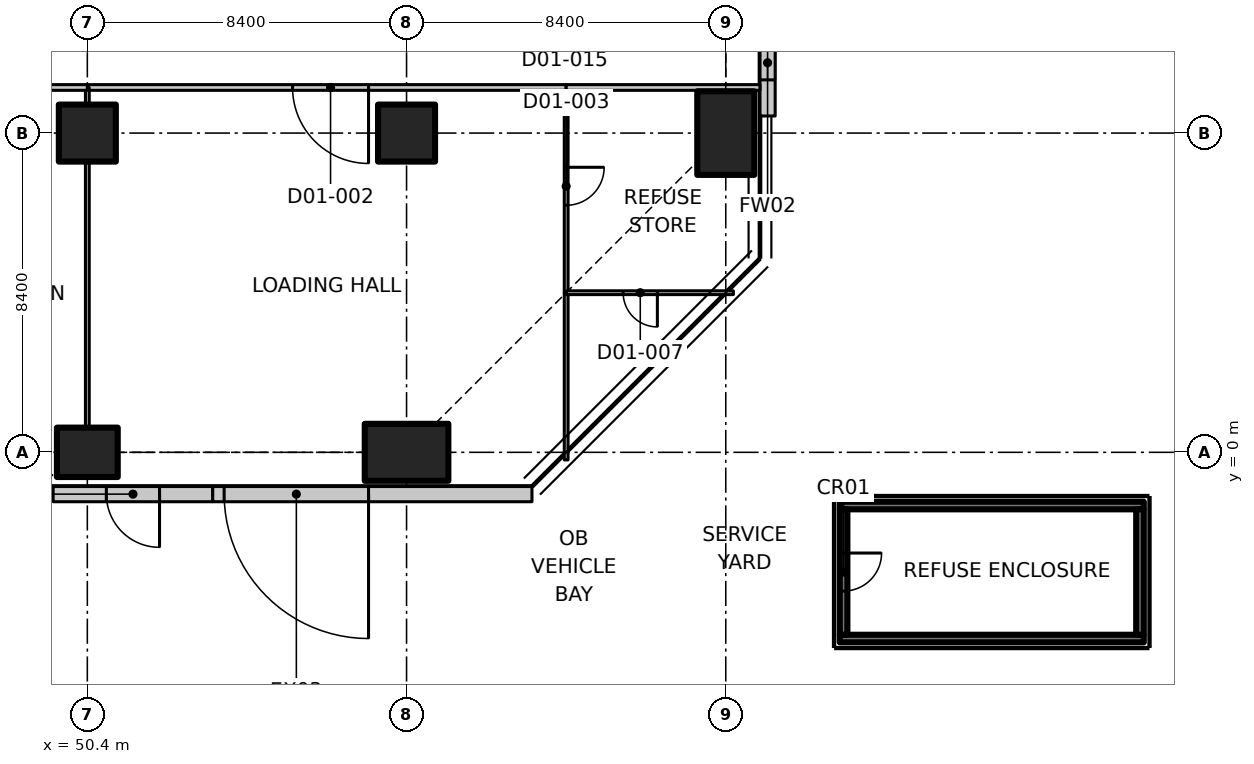
"""IFC4 building model, lengths in metres.
Left out: names, types, materials, properties, quantities, classifications, styles, units other than length and angle.
Written with IfcOpenShell. Run it as: python <this file> out.ifc"""

import sys

from ifc_helpers import new_model, si_unit, direction, frame, frame_2d, origin, origin_2d, place, context, subcontext, project, spatial, polyline, rectangle, outline, extrude, element, fill, save


model = new_model("IFC4")
c1 = context("Model", 3, precision=1e-05, world=origin(), true_north=direction((0.0, 1.0)))
c2 = subcontext(c1, "Body", "Model", "MODEL_VIEW")
j1 = project(units=[si_unit("LENGTHUNIT", "METRE"), si_unit("PLANEANGLEUNIT", "RADIAN")], contexts=[c1])
p1 = place(None, origin())
s1 = spatial("IfcSite", under=j1, at=p1, CompositionType="ELEMENT")
p2 = place(p1, origin())
s2 = spatial("IfcBuilding", under=s1, at=p2, CompositionType="ELEMENT")
p3 = place(p2, origin())
s3 = spatial("IfcBuildingStorey", under=s2, at=p3, CompositionType="ELEMENT", Elevation=0.0)
p4 = place(p3, frame((50.4, 0.0, 0.0), z_axis=(0.0, 0.0, 1.0), x_axis=(0.0, 1.0, 0.0)))
e1 = element("IfcColumn", 1, at=p4, inside=s3, PredefinedType="COLUMN", context=c2, shape_type="SweptSolid", body=[
    extrude(rectangle(XDim=1.3, YDim=1.6, at=origin_2d()), origin(), (0.0, 0.0, 1.0), 6.75),
])
p5 = place(p3, frame((50.4, 8.4, 0.0), z_axis=(0.0, 0.0, 1.0), x_axis=(1.0, 0.0, 0.0)))
e2 = element("IfcColumn", 2, at=p5, inside=s3, PredefinedType="COLUMN", context=c2, shape_type="SweptSolid", body=[
    extrude(rectangle(XDim=1.5, YDim=1.5, at=origin_2d()), origin(), (0.0, 0.0, 1.0), 6.75),
])
p6 = place(p3, frame((58.8, 0.0, 0.0), z_axis=(0.0, 0.0, 1.0), x_axis=(0.0, 1.0, 0.0)))
e3 = element("IfcColumn", 3, at=p6, inside=s3, PredefinedType="COLUMN", context=c2, shape_type="SweptSolid", body=[
    extrude(rectangle(XDim=1.5, YDim=2.2, at=origin_2d()), origin(), (0.0, 0.0, 1.0), 6.75),
])
p7 = place(p3, frame((58.8, 8.4, 0.0), z_axis=(0.0, 0.0, 1.0), x_axis=(1.0, 0.0, 0.0)))
e4 = element("IfcColumn", 4, at=p7, inside=s3, PredefinedType="COLUMN", context=c2, shape_type="SweptSolid", body=[
    extrude(rectangle(XDim=1.5, YDim=1.5, at=origin_2d()), origin(), (0.0, 0.0, 1.0), 6.75),
])
p8 = place(p3, frame((67.2, 8.4, 0.0), z_axis=(0.0, 0.0, 1.0), x_axis=(1.0, 0.0, 0.0)))
e5 = element("IfcColumn", 5, at=p8, inside=s3, PredefinedType="COLUMN", context=c2, shape_type="SweptSolid", body=[
    extrude(rectangle(XDim=1.5, YDim=2.2, at=origin_2d()), origin(), (0.0, 0.0, 1.0), 6.75),
])
p9 = place(p3, frame((53.7, -1.1, 0.0), z_axis=(0.0, 0.0, 1.0), x_axis=(-1.0, 0.0, 0.0)))
e6 = element("IfcWall", 6, at=p9, inside=s3, PredefinedType="SOLIDWALL", context=c2, shape_type="SweptSolid", body=[
    extrude(rectangle(XDim=4.2, YDim=0.4, at=frame_2d((2.1, 0.0))), origin(), (0.0, 0.0, 1.0), 6.75),
])
p10 = place(p9, frame((1.4, 0.0, 0.0)))
e7 = element("IfcOpeningElement", 7, at=p10, cuts=e6, PredefinedType="OPENING", context=c2, shape_type="SweptSolid", body=[
    extrude(rectangle(XDim=1.4, YDim=2.4, at=frame_2d((0.7, 1.2))), frame((0.0, 0.21, 0.0), z_axis=(0.0, -1.0, 0.0), x_axis=(1.0, 0.0, 0.0)), (0.0, 0.0, 1.0), 0.42),
])
p11 = place(p3, frame((62.1, -1.1, 0.0), z_axis=(0.0, 0.0, 1.0), x_axis=(-1.0, 0.0, 0.0)))
e8 = element("IfcWall", 8, at=p11, inside=s3, PredefinedType="SOLIDWALL", context=c2, shape_type="SweptSolid", body=[
    extrude(rectangle(XDim=8.4, YDim=0.4, at=frame_2d((4.2, 0.0))), origin(), (0.0, 0.0, 1.0), 6.75),
])
p12 = place(p11, frame((4.3, 0.0, 0.0)))
e9 = element("IfcOpeningElement", 9, at=p12, cuts=e8, PredefinedType="OPENING", context=c2, shape_type="SweptSolid", body=[
    extrude(rectangle(XDim=3.8, YDim=4.5, at=frame_2d((1.9, 2.25))), frame((0.0, 0.21, 0.0), z_axis=(0.0, -1.0, 0.0), x_axis=(1.0, 0.0, 0.0)), (0.0, 0.0, 1.0), 0.42),
])
p13 = place(p3, frame((68.3, 16.35, 0.0), z_axis=(0.0, 0.0, 1.0), x_axis=(0.0, -1.0, 0.0)))
e10 = element("IfcWall", 10, at=p13, inside=s3, PredefinedType="SOLIDWALL", context=c2, shape_type="SweptSolid", body=[
    extrude(rectangle(XDim=7.5, YDim=0.4, at=frame_2d((3.75, 0.0))), origin(), (0.0, 0.0, 1.0), 6.75),
])
p14 = place(p13, frame((1.95, 0.0, 0.0)))
e11 = element("IfcOpeningElement", 11, at=p14, cuts=e10, PredefinedType="OPENING", context=c2, shape_type="SweptSolid", body=[
    extrude(rectangle(XDim=3.6, YDim=2.8, at=frame_2d((1.8, 1.4))), frame((0.0, 0.21, 0.0), z_axis=(0.0, -1.0, 0.0), x_axis=(1.0, 0.0, 0.0)), (0.0, 0.0, 1.0), 0.42),
])
p15 = place(p13, frame((0.95, 0.0, 0.0)))
e12 = element("IfcOpeningElement", 12, at=p15, cuts=e10, PredefinedType="OPENING", context=c2, shape_type="SweptSolid", body=[
    extrude(rectangle(XDim=0.9, YDim=2.8, at=frame_2d((0.45, 1.4))), frame((0.0, 0.21, 0.0), z_axis=(0.0, -1.0, 0.0), x_axis=(1.0, 0.0, 0.0)), (0.0, 0.0, 1.0), 0.42),
])
p16 = place(p13, frame((5.65, 0.0, 0.0)))
e13 = element("IfcOpeningElement", 13, at=p16, cuts=e10, PredefinedType="OPENING", context=c2, shape_type="SweptSolid", body=[
    extrude(rectangle(XDim=0.9, YDim=2.8, at=frame_2d((0.45, 1.4))), frame((0.0, 0.21, 0.0), z_axis=(0.0, -1.0, 0.0), x_axis=(1.0, 0.0, 0.0)), (0.0, 0.0, 1.0), 0.42),
])
for number, where, z_axis, x_axis in (
    (14, (70.2, -1.4, 0.0), (0.0, 0.0, 1.0), (1.0, 0.0, 0.0)),
    (15, (70.2, -4.9, 0.0), (0.0, 0.0, 1.0), (1.0, 0.0, 0.0)),
):
    element("IfcWall", number, at=place(p3, frame(where, z_axis=z_axis, x_axis=x_axis)), inside=s3, PredefinedType="SOLIDWALL", context=c2, shape_type="SweptSolid", body=[
        extrude(rectangle(XDim=8.0, YDim=0.2, at=frame_2d((4.0, 0.0))), origin(), (0.0, 0.0, 1.0), 3.0),
    ])
p17 = place(p3, frame((78.1, -4.8, 0.0), z_axis=(0.0, 0.0, 1.0), x_axis=(0.0, 1.0, 0.0)))
e16 = element("IfcWall", 16, at=p17, inside=s3, PredefinedType="SOLIDWALL", context=c2, shape_type="SweptSolid", body=[
    extrude(rectangle(XDim=3.3, YDim=0.2, at=frame_2d((1.65, 0.0))), origin(), (0.0, 0.0, 1.0), 3.0),
])
p18 = place(p3, frame((70.3, -1.5, 0.0), z_axis=(0.0, 0.0, 1.0), x_axis=(0.0, -1.0, 0.0)))
e17 = element("IfcWall", 17, at=p18, inside=s3, PredefinedType="SOLIDWALL", context=c2, shape_type="SweptSolid", body=[
    extrude(rectangle(XDim=3.3, YDim=0.2, at=frame_2d((1.65, 0.0))), origin(), (0.0, 0.0, 1.0), 3.0),
])
p19 = place(p18, frame((1.15, 0.0, 0.0)))
e18 = element("IfcOpeningElement", 18, at=p19, cuts=e17, PredefinedType="OPENING", context=c2, shape_type="SweptSolid", body=[
    extrude(rectangle(XDim=1.0, YDim=2.1, at=frame_2d((0.5, 1.05))), frame((0.0, 0.11, 0.0), z_axis=(0.0, -1.0, 0.0), x_axis=(1.0, 0.0, 0.0)), (0.0, 0.0, 1.0), 0.22),
])
p20 = place(p3, frame((63.0, 9.6, 0.0), z_axis=(0.0, 0.0, 1.0), x_axis=(0.0, -1.0, 0.0)))
e19 = element("IfcWall", 19, at=p20, inside=s3, PredefinedType="PARTITIONING", context=c2, shape_type="SweptSolid", body=[
    extrude(outline(polyline([(0.0, 0.0), (5.4, 0.0), (5.4, 6.38), (4.736, 6.38), (4.734, 6.73), (0.0, 6.73), (0.0, 0.0)])), frame((0.0, 0.05, 0.0), z_axis=(0.0, -1.0, 0.0), x_axis=(1.0, 0.0, 0.0)), (0.0, 0.0, 1.0), 0.1),
])
p21 = place(p20, frame((2.1, 0.0, 0.0)))
e20 = element("IfcOpeningElement", 20, at=p21, cuts=e19, PredefinedType="OPENING", context=c2, shape_type="SweptSolid", body=[
    extrude(rectangle(XDim=1.0, YDim=2.1, at=frame_2d((0.5, 1.05))), frame((0.0, 0.06, 0.0), z_axis=(0.0, -1.0, 0.0), x_axis=(1.0, 0.0, 0.0)), (0.0, 0.0, 1.0), 0.12),
])
p22 = place(p3, frame((63.0, 9.6, 0.0), z_axis=(0.0, 0.0, 1.0), x_axis=(-1.0, 0.0, 0.0)))
e21 = element("IfcWall", 21, at=p22, inside=s3, PredefinedType="PARTITIONING", context=c2, shape_type="SweptSolid", body=[
    extrude(rectangle(XDim=12.6, YDim=0.15, at=frame_2d((6.3, 0.0))), origin(), (0.0, 0.0, 1.0), 6.73),
])
p23 = place(p22, frame((5.2, 0.0, 0.0)))
e22 = element("IfcOpeningElement", 22, at=p23, cuts=e21, PredefinedType="OPENING", context=c2, shape_type="SweptSolid", body=[
    extrude(rectangle(XDim=2.0, YDim=2.4, at=frame_2d((1.0, 1.2))), frame((0.0, 0.085, 0.0), z_axis=(0.0, -1.0, 0.0), x_axis=(1.0, 0.0, 0.0)), (0.0, 0.0, 1.0), 0.17),
])
p24 = place(p3, frame((50.4, 0.67, 0.0), z_axis=(0.0, 0.0, 1.0), x_axis=(0.0, 1.0, 0.0)))
e23 = element("IfcWall", 23, at=p24, inside=s3, PredefinedType="PARTITIONING", context=c2, shape_type="SweptSolid", body=[
    extrude(rectangle(XDim=6.96, YDim=0.1, at=frame_2d((3.48, 0.0))), origin(), (0.0, 0.0, 1.0), 6.73),
])
p25 = place(p3, frame((50.4, 9.17, 0.0), z_axis=(0.0, 0.0, 1.0), x_axis=(0.0, 1.0, 0.0)))
e24 = element("IfcWall", 24, at=p25, inside=s3, PredefinedType="PARTITIONING", context=c2, shape_type="SweptSolid", body=[
    extrude(rectangle(XDim=0.43, YDim=0.1, at=frame_2d((0.215, 0.0))), origin(), (0.0, 0.0, 1.0), 6.73),
])
p26 = place(p3, frame((63.0, 4.2, 0.0), z_axis=(0.0, 0.0, 1.0), x_axis=(0.0, -1.0, 0.0)))
e25 = element("IfcWall", 25, at=p26, inside=s3, PredefinedType="PARTITIONING", context=c2, shape_type="SweptSolid", body=[
    extrude(rectangle(XDim=4.4, YDim=0.1, at=frame_2d((2.2, 0.0))), origin(), (0.0, 0.0, 1.0), 6.38),
])
p27 = place(p3, frame((63.0, 9.6, 0.0), z_axis=(0.0, 0.0, 1.0), x_axis=(1.0, 0.0, 0.0)))
e26 = element("IfcWall", 26, at=p27, inside=s3, PredefinedType="PARTITIONING", context=c2, shape_type="SweptSolid", body=[
    extrude(outline(polyline([(0.0, 0.0), (5.1, 0.0), (5.1, 6.73), (4.65, 6.73), (4.648, 6.38), (3.752, 6.38), (3.75, 6.73), (0.0, 6.73), (0.0, 0.0)])), frame((0.0, 0.075, 0.0), z_axis=(0.0, -1.0, 0.0), x_axis=(1.0, 0.0, 0.0)), (0.0, 0.0, 1.0), 0.15),
])
p28 = place(p3, frame((67.4, 4.2, 0.0), z_axis=(0.0, 0.0, 1.0), x_axis=(-1.0, 0.0, 0.0)))
e27 = element("IfcWall", 27, at=p28, inside=s3, PredefinedType="PARTITIONING", context=c2, shape_type="SweptSolid", body=[
    extrude(rectangle(XDim=4.4, YDim=0.1, at=frame_2d((2.2, 0.0))), origin(), (0.0, 0.0, 1.0), 6.38),
])
p29 = place(p28, frame((2.0, 0.0, 0.0)))
e28 = element("IfcOpeningElement", 28, at=p29, cuts=e27, PredefinedType="OPENING", context=c2, shape_type="SweptSolid", body=[
    extrude(rectangle(XDim=0.9, YDim=2.1, at=frame_2d((0.45, 1.05))), frame((0.0, 0.06, 0.0), z_axis=(0.0, -1.0, 0.0), x_axis=(1.0, 0.0, 0.0)), (0.0, 0.0, 1.0), 0.12),
])
p30 = place(p3, frame((50.4, 9.6, 0.0), z_axis=(0.0, 0.0, 1.0), x_axis=(-1.0, 0.0, 0.0)))
e29 = element("IfcWall", 29, at=p30, inside=s3, PredefinedType="PARTITIONING", context=c2, shape_type="SweptSolid", body=[
    extrude(rectangle(XDim=4.2, YDim=0.15, at=frame_2d((2.1, 0.0))), origin(), (0.0, 0.0, 1.0), 6.73),
])
p31 = place(p30, frame((1.2, 0.0, 0.0)))
e30 = element("IfcOpeningElement", 30, at=p31, cuts=e29, PredefinedType="OPENING", context=c2, shape_type="SweptSolid", body=[
    extrude(rectangle(XDim=2.0, YDim=2.4, at=frame_2d((1.0, 1.2))), frame((0.0, 0.085, 0.0), z_axis=(0.0, -1.0, 0.0), x_axis=(1.0, 0.0, 0.0)), (0.0, 0.0, 1.0), 0.17),
])
p32 = place(p10, origin())
e31 = element("IfcDoor", 31, at=p32, inside=s3, OperationType="DOUBLE_DOOR_SINGLE_SWING", PredefinedType="DOOR", context=c2, shape_type="SweptSolid", body=[
    extrude(rectangle(XDim=1.4, YDim=2.4, at=frame_2d((0.7, 1.2))), frame((0.0, 0.025, 0.0), z_axis=(0.0, -1.0, 0.0), x_axis=(1.0, 0.0, 0.0)), (0.0, 0.0, 1.0), 0.05),
])
fill(e7, e31)
p33 = place(p12, origin())
e32 = element("IfcDoor", 32, at=p33, inside=s3, OperationType="ROLLINGUP", PredefinedType="DOOR", context=c2, shape_type="SweptSolid", body=[
    extrude(rectangle(XDim=3.8, YDim=4.5, at=frame_2d((1.9, 2.25))), frame((0.0, 0.025, 0.0), z_axis=(0.0, -1.0, 0.0), x_axis=(1.0, 0.0, 0.0)), (0.0, 0.0, 1.0), 0.05),
])
fill(e9, e32)
p34 = place(p16, origin())
e33 = element("IfcWindow", 33, at=p34, inside=s3, PartitioningType="SINGLE_PANEL", PredefinedType="WINDOW", context=c2, shape_type="SweptSolid", body=[
    extrude(rectangle(XDim=0.9, YDim=2.8, at=frame_2d((0.45, 1.4))), frame((0.0, 0.03, 0.0), z_axis=(0.0, -1.0, 0.0), x_axis=(1.0, 0.0, 0.0)), (0.0, 0.0, 1.0), 0.06),
])
fill(e13, e33)
p35 = place(p19, origin())
e34 = element("IfcDoor", 34, at=p35, inside=s3, OperationType="SINGLE_SWING_LEFT", PredefinedType="DOOR", context=c2, shape_type="SweptSolid", body=[
    extrude(rectangle(XDim=1.0, YDim=2.1, at=frame_2d((0.5, 1.05))), frame((0.0, 0.025, 0.0), z_axis=(0.0, -1.0, 0.0), x_axis=(1.0, 0.0, 0.0)), (0.0, 0.0, 1.0), 0.05),
])
fill(e18, e34)
p36 = place(p23, origin())
e35 = element("IfcDoor", 35, at=p36, inside=s3, OperationType="DOUBLE_DOOR_SINGLE_SWING", PredefinedType="DOOR", context=c2, shape_type="SweptSolid", body=[
    extrude(rectangle(XDim=2.0, YDim=2.4, at=frame_2d((1.0, 1.2))), frame((0.0, 0.025, 0.0), z_axis=(0.0, -1.0, 0.0), x_axis=(1.0, 0.0, 0.0)), (0.0, 0.0, 1.0), 0.05),
])
fill(e22, e35)
p37 = place(p21, origin())
e36 = element("IfcDoor", 36, at=p37, inside=s3, OperationType="SINGLE_SWING_LEFT", PredefinedType="DOOR", context=c2, shape_type="SweptSolid", body=[
    extrude(rectangle(XDim=1.0, YDim=2.1, at=frame_2d((0.5, 1.05))), frame((0.0, 0.025, 0.0), z_axis=(0.0, -1.0, 0.0), x_axis=(1.0, 0.0, 0.0)), (0.0, 0.0, 1.0), 0.05),
])
fill(e20, e36)
p38 = place(p29, origin())
e37 = element("IfcDoor", 37, at=p38, inside=s3, OperationType="SINGLE_SWING_LEFT", PredefinedType="DOOR", context=c2, shape_type="SweptSolid", body=[
    extrude(rectangle(XDim=0.9, YDim=2.1, at=frame_2d((0.45, 1.05))), frame((0.0, 0.025, 0.0), z_axis=(0.0, -1.0, 0.0), x_axis=(1.0, 0.0, 0.0)), (0.0, 0.0, 1.0), 0.05),
])
fill(e28, e37)
save(model, sys.argv[1])
